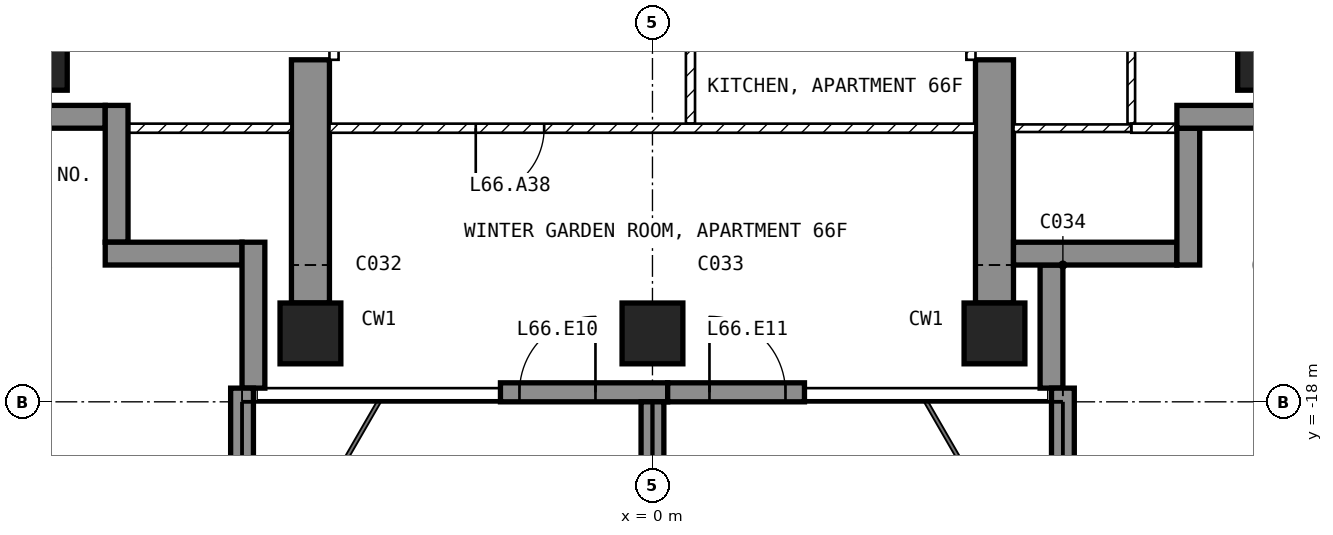
"""IFC4 building model, lengths in metres.
Left out: names, types, materials, properties, quantities, classifications, styles, units other than length and angle.
Written with IfcOpenShell. Run it as: python <this file> out.ifc"""

import sys

from ifc_helpers import new_model, si_unit, direction, frame, frame_2d, origin, origin_2d, place, context, subcontext, project, spatial, polyline, rectangle, outline, extrude, element, fill, save


model = new_model("IFC4")
c1 = context("Model", 3, precision=1e-05, world=origin(), true_north=direction((0.0, 1.0)))
c2 = subcontext(c1, "Body", "Model", "MODEL_VIEW")
j1 = project(units=[si_unit("LENGTHUNIT", "METRE"), si_unit("PLANEANGLEUNIT", "RADIAN")], contexts=[c1])
p1 = place(None, origin())
s1 = spatial("IfcSite", under=j1, at=p1, CompositionType="ELEMENT")
p2 = place(p1, origin())
s2 = spatial("IfcBuilding", under=s1, at=p2, CompositionType="ELEMENT")
p3 = place(p2, frame((0.0, 0.0, 260.5)))
s3 = spatial("IfcBuildingStorey", under=s2, at=p3, CompositionType="ELEMENT", Elevation=260.5)
for number, where, z_axis, x_axis in (
    (1, (-8.1, -13.5, -0.25), (0.0, 0.0, 1.0), (1.0, 0.0, 0.0)),
    (2, (-4.5, -17.1, -0.25), (0.0, 0.0, 1.0), (1.0, 0.0, 0.0)),
    (3, (0.0, -17.1, -0.25), (0.0, 0.0, 1.0), (1.0, 0.0, 0.0)),
    (4, (4.5, -17.1, -0.25), (0.0, 0.0, 1.0), (1.0, 0.0, 0.0)),
    (5, (8.1, -13.5, -0.25), (0.0, 0.0, 1.0), (1.0, 0.0, 0.0)),
):
    element("IfcColumn", number, at=place(p3, frame(where, z_axis=z_axis, x_axis=x_axis)), inside=s3, PredefinedType="COLUMN", context=c2, shape_type="SweptSolid", body=[
        extrude(rectangle(XDim=0.8, YDim=0.8, at=origin_2d()), origin(), (0.0, 0.0, 1.0), 3.5),
    ])
for number, where, z_axis, x_axis in (
    (6, (-4.75, -16.7, -0.25), (1.0, 0.0, 0.0), (0.0, 1.0, 0.0)),
    (7, (4.25, -16.7, -0.25), (1.0, 0.0, 0.0), (0.0, 1.0, 0.0)),
):
    element("IfcWall", number, at=place(p3, frame(where, z_axis=z_axis, x_axis=x_axis)), inside=s3, PredefinedType="SHEAR", context=c2, shape_type="SweptSolid", body=[
        extrude(outline(polyline([(0.0, 0.0), (3.2, 0.0), (3.2, 2.65), (5.6, 2.65), (5.6, 0.0), (7.7, 0.0), (7.7, 3.5), (0.0, 3.5), (0.0, 0.0)])), origin(), (0.0, 0.0, 1.0), 0.5),
    ])
p4 = place(p3, frame((-2.0, -17.875, 0.0), z_axis=(0.0, 0.0, 1.0), x_axis=(1.0, 0.0, 0.0)))
e8 = element("IfcWall", 8, at=p4, inside=s3, PredefinedType="SOLIDWALL", context=c2, shape_type="SweptSolid", body=[
    extrude(rectangle(XDim=2.2, YDim=0.25, at=frame_2d((1.1, 0.0))), origin(), (0.0, 0.0, 1.0), 3.25),
])
p5 = place(p4, frame((0.25, 0.0, 0.0)))
e9 = element("IfcOpeningElement", 9, at=p5, cuts=e8, PredefinedType="OPENING", context=c2, shape_type="SweptSolid", body=[
    extrude(rectangle(XDim=1.0, YDim=2.4, at=frame_2d((0.5, 1.2))), frame((0.0, 0.135, 0.0), z_axis=(0.0, -1.0, 0.0), x_axis=(1.0, 0.0, 0.0)), (0.0, 0.0, 1.0), 0.27),
])
p6 = place(p3, frame((0.2, -17.875, 0.0), z_axis=(0.0, 0.0, 1.0), x_axis=(1.0, 0.0, 0.0)))
e10 = element("IfcWall", 10, at=p6, inside=s3, PredefinedType="SOLIDWALL", context=c2, shape_type="SweptSolid", body=[
    extrude(rectangle(XDim=1.8, YDim=0.25, at=frame_2d((0.9, 0.0))), origin(), (0.0, 0.0, 1.0), 3.25),
])
p7 = place(p6, frame((0.55, 0.0, 0.0)))
e11 = element("IfcOpeningElement", 11, at=p7, cuts=e10, PredefinedType="OPENING", context=c2, shape_type="SweptSolid", body=[
    extrude(rectangle(XDim=1.0, YDim=2.4, at=frame_2d((0.5, 1.2))), frame((0.0, 0.135, 0.0), z_axis=(0.0, -1.0, 0.0), x_axis=(1.0, 0.0, 0.0)), (0.0, 0.0, 1.0), 0.27),
])
p8 = place(p3, frame((5.25, -17.82, 0.0), z_axis=(0.0, 0.0, 1.0), x_axis=(0.0, 1.0, 0.0)))
e12 = element("IfcWall", 12, at=p8, inside=s3, PredefinedType="SOLIDWALL", context=c2, shape_type="SweptSolid", body=[
    extrude(rectangle(XDim=1.62, YDim=0.3, at=frame_2d((0.81, 0.0))), origin(), (0.0, 0.0, 1.0), 3.25),
])
p9 = place(p3, frame((4.75, -16.05, 0.0), z_axis=(0.0, 0.0, 1.0), x_axis=(1.0, 0.0, 0.0)))
e13 = element("IfcWall", 13, at=p9, inside=s3, PredefinedType="SOLIDWALL", context=c2, shape_type="SweptSolid", body=[
    extrude(rectangle(XDim=2.15, YDim=0.3, at=frame_2d((1.075, 0.0))), origin(), (0.0, 0.0, 1.0), 3.25),
])
p10 = place(p3, frame((7.05, -16.2, 0.0), z_axis=(0.0, 0.0, 1.0), x_axis=(0.0, 1.0, 0.0)))
e14 = element("IfcWall", 14, at=p10, inside=s3, PredefinedType="SOLIDWALL", context=c2, shape_type="SweptSolid", body=[
    extrude(rectangle(XDim=1.8, YDim=0.3, at=frame_2d((0.9, 0.0))), origin(), (0.0, 0.0, 1.0), 3.25),
])
p11 = place(p3, frame((6.9, -14.25, 0.0), z_axis=(0.0, 0.0, 1.0), x_axis=(1.0, 0.0, 0.0)))
e15 = element("IfcWall", 15, at=p11, inside=s3, PredefinedType="SOLIDWALL", context=c2, shape_type="SweptSolid", body=[
    extrude(rectangle(XDim=1.85, YDim=0.3, at=frame_2d((0.925, 0.0))), origin(), (0.0, 0.0, 1.0), 3.25),
])
p12 = place(p3, frame((-8.75, -14.25, 0.0), z_axis=(0.0, 0.0, 1.0), x_axis=(1.0, 0.0, 0.0)))
e16 = element("IfcWall", 16, at=p12, inside=s3, PredefinedType="SOLIDWALL", context=c2, shape_type="SweptSolid", body=[
    extrude(rectangle(XDim=1.55, YDim=0.3, at=frame_2d((0.775, 0.0))), origin(), (0.0, 0.0, 1.0), 3.25),
])
p13 = place(p3, frame((-7.05, -14.1, 0.0), z_axis=(0.0, 0.0, 1.0), x_axis=(0.0, -1.0, 0.0)))
e17 = element("IfcWall", 17, at=p13, inside=s3, PredefinedType="SOLIDWALL", context=c2, shape_type="SweptSolid", body=[
    extrude(rectangle(XDim=1.8, YDim=0.3, at=frame_2d((0.9, 0.0))), origin(), (0.0, 0.0, 1.0), 3.25),
])
p14 = place(p3, frame((-7.2, -16.05, 0.0), z_axis=(0.0, 0.0, 1.0), x_axis=(1.0, 0.0, 0.0)))
e18 = element("IfcWall", 18, at=p14, inside=s3, PredefinedType="SOLIDWALL", context=c2, shape_type="SweptSolid", body=[
    extrude(rectangle(XDim=1.8, YDim=0.3, at=frame_2d((0.9, 0.0))), origin(), (0.0, 0.0, 1.0), 3.25),
])
p15 = place(p3, frame((-5.25, -15.9, 0.0), z_axis=(0.0, 0.0, 1.0), x_axis=(0.0, -1.0, 0.0)))
e19 = element("IfcWall", 19, at=p15, inside=s3, PredefinedType="SOLIDWALL", context=c2, shape_type="SweptSolid", body=[
    extrude(rectangle(XDim=1.92, YDim=0.3, at=frame_2d((0.96, 0.0))), origin(), (0.0, 0.0, 1.0), 3.25),
])
p16 = place(p3, frame((-5.4, -17.82, 0.0), z_axis=(0.0, 0.0, 1.0), x_axis=(0.0, -1.0, 0.0)))
e20 = element("IfcWall", 20, at=p16, inside=s3, PredefinedType="SOLIDWALL", context=c2, shape_type="SweptSolid", body=[
    extrude(rectangle(XDim=2.88, YDim=0.3, at=frame_2d((1.44, 0.0))), origin(), (0.0, 0.0, 1.0), 3.25),
])
p17 = place(p3, frame((0.0, -18.0, 0.0), z_axis=(0.0, 0.0, 1.0), x_axis=(0.0, -1.0, 0.0)))
e21 = element("IfcWall", 21, at=p17, inside=s3, PredefinedType="SOLIDWALL", context=c2, shape_type="SweptSolid", body=[
    extrude(rectangle(XDim=2.7, YDim=0.3, at=frame_2d((1.35, 0.0))), origin(), (0.0, 0.0, 1.0), 3.25),
])
p18 = place(p3, frame((5.4, -17.82, 0.0), z_axis=(0.0, 0.0, 1.0), x_axis=(0.0, -1.0, 0.0)))
e22 = element("IfcWall", 22, at=p18, inside=s3, PredefinedType="SOLIDWALL", context=c2, shape_type="SweptSolid", body=[
    extrude(rectangle(XDim=2.88, YDim=0.3, at=frame_2d((1.44, 0.0))), origin(), (0.0, 0.0, 1.0), 3.25),
])
p19 = place(p3, frame((0.5, -11.46, 0.0), z_axis=(0.0, 0.0, 1.0), x_axis=(0.0, -1.0, 0.0)))
e23 = element("IfcWall", 23, at=p19, inside=s3, PredefinedType="PARTITIONING", context=c2, shape_type="SweptSolid", body=[
    extrude(rectangle(XDim=2.88, YDim=0.12, at=frame_2d((1.44, 0.0))), origin(), (0.0, 0.0, 1.0), 3.25),
])
p20 = place(p19, frame((0.99, 0.0, 0.0)))
e24 = element("IfcOpeningElement", 24, at=p20, cuts=e23, PredefinedType="OPENING", context=c2, shape_type="SweptSolid", body=[
    extrude(rectangle(XDim=0.9, YDim=2.1, at=frame_2d((0.45, 1.05))), frame((0.0, 0.07, 0.0), z_axis=(0.0, -1.0, 0.0), x_axis=(1.0, 0.0, 0.0)), (0.0, 0.0, 1.0), 0.14),
])
p21 = place(p3, frame((4.25, -14.4, 0.0), z_axis=(0.0, 0.0, 1.0), x_axis=(-1.0, 0.0, 0.0)))
e25 = element("IfcWall", 25, at=p21, inside=s3, PredefinedType="PARTITIONING", context=c2, shape_type="SweptSolid", body=[
    extrude(rectangle(XDim=8.5, YDim=0.12, at=frame_2d((4.25, 0.0))), origin(), (0.0, 0.0, 1.0), 3.25),
])
p22 = place(p21, frame((5.675, 0.0, 0.0)))
e26 = element("IfcOpeningElement", 26, at=p22, cuts=e25, PredefinedType="OPENING", context=c2, shape_type="SweptSolid", body=[
    extrude(rectangle(XDim=0.9, YDim=2.1, at=frame_2d((0.45, 1.05))), frame((0.0, 0.07, 0.0), z_axis=(0.0, -1.0, 0.0), x_axis=(1.0, 0.0, 0.0)), (0.0, 0.0, 1.0), 0.14),
])
p23 = place(p3, frame((6.3, -14.34, 0.0), z_axis=(0.0, 0.0, 1.0), x_axis=(0.0, 1.0, 0.0)))
e27 = element("IfcWall", 27, at=p23, inside=s3, PredefinedType="PARTITIONING", context=c2, shape_type="SweptSolid", body=[
    extrude(rectangle(XDim=2.89, YDim=0.1, at=frame_2d((1.445, 0.0))), origin(), (0.0, 0.0, 1.0), 3.25),
])
p24 = place(p23, frame((1.02, 0.0, 0.0)))
e28 = element("IfcOpeningElement", 28, at=p24, cuts=e27, PredefinedType="OPENING", context=c2, shape_type="SweptSolid", body=[
    extrude(rectangle(XDim=0.85, YDim=2.1, at=frame_2d((0.425, 1.05))), frame((0.0, 0.06, 0.0), z_axis=(0.0, -1.0, 0.0), x_axis=(1.0, 0.0, 0.0)), (0.0, 0.0, 1.0), 0.12),
])
p25 = place(p3, frame((7.12, -14.4, 0.0), z_axis=(0.0, 0.0, 1.0), x_axis=(-1.0, 0.0, 0.0)))
e29 = element("IfcWall", 29, at=p25, inside=s3, PredefinedType="PARTITIONING", context=c2, shape_type="SweptSolid", body=[
    extrude(rectangle(XDim=0.82, YDim=0.12, at=frame_2d((0.41, 0.0))), origin(), (0.0, 0.0, 1.0), 3.25),
])
p26 = place(p3, frame((6.3, -14.4, 0.0), z_axis=(0.0, 0.0, 1.0), x_axis=(-1.0, 0.0, 0.0)))
e30 = element("IfcWall", 30, at=p26, inside=s3, PredefinedType="PARTITIONING", context=c2, shape_type="SweptSolid", body=[
    extrude(rectangle(XDim=1.55, YDim=0.1, at=frame_2d((0.775, 0.0))), origin(), (0.0, 0.0, 1.0), 3.25),
])
p27 = place(p3, frame((-4.75, -14.4, 0.0), z_axis=(0.0, 0.0, 1.0), x_axis=(-1.0, 0.0, 0.0)))
e31 = element("IfcWall", 31, at=p27, inside=s3, PredefinedType="PARTITIONING", context=c2, shape_type="SweptSolid", body=[
    extrude(rectangle(XDim=2.37, YDim=0.12, at=frame_2d((1.185, 0.0))), origin(), (0.0, 0.0, 1.0), 3.25),
])
p28 = place(p3, frame((4.19, -11.1, 0.0), z_axis=(0.0, 0.0, 1.0), x_axis=(0.0, -1.0, 0.0)))
e32 = element("IfcWall", 32, at=p28, inside=s3, PredefinedType="PARTITIONING", context=c2, shape_type="SweptSolid", body=[
    extrude(rectangle(XDim=2.4, YDim=0.12, at=frame_2d((1.2, 0.0))), origin(), (0.0, 0.0, 1.0), 2.4),
])
p29 = place(p28, frame((0.75, 0.0, 0.0)))
e33 = element("IfcOpeningElement", 33, at=p29, cuts=e32, PredefinedType="OPENING", context=c2, shape_type="SweptSolid", body=[
    extrude(rectangle(XDim=0.9, YDim=2.1, at=frame_2d((0.45, 1.05))), frame((0.0, 0.07, 0.0), z_axis=(0.0, -1.0, 0.0), x_axis=(1.0, 0.0, 0.0)), (0.0, 0.0, 1.0), 0.14),
])
p30 = place(p3, frame((-4.19, -11.1, 0.0), z_axis=(0.0, 0.0, 1.0), x_axis=(0.0, -1.0, 0.0)))
e34 = element("IfcWall", 34, at=p30, inside=s3, PredefinedType="PARTITIONING", context=c2, shape_type="SweptSolid", body=[
    extrude(rectangle(XDim=2.4, YDim=0.12, at=frame_2d((1.2, 0.0))), origin(), (0.0, 0.0, 1.0), 2.4),
])
p31 = place(p30, frame((0.75, 0.0, 0.0)))
e35 = element("IfcOpeningElement", 35, at=p31, cuts=e34, PredefinedType="OPENING", context=c2, shape_type="SweptSolid", body=[
    extrude(rectangle(XDim=0.9, YDim=2.1, at=frame_2d((0.45, 1.05))), frame((0.0, 0.07, 0.0), z_axis=(0.0, -1.0, 0.0), x_axis=(1.0, 0.0, 0.0)), (0.0, 0.0, 1.0), 0.14),
])
p32 = place(p5, origin())
e36 = element("IfcDoor", 36, at=p32, inside=s3, OperationType="SINGLE_SWING_RIGHT", PredefinedType="DOOR", context=c2, shape_type="SweptSolid", body=[
    extrude(rectangle(XDim=1.0, YDim=2.4, at=frame_2d((0.5, 1.2))), frame((0.0, 0.025, 0.0), z_axis=(0.0, -1.0, 0.0), x_axis=(1.0, 0.0, 0.0)), (0.0, 0.0, 1.0), 0.05),
])
fill(e9, e36)
p33 = place(p7, origin())
e37 = element("IfcDoor", 37, at=p33, inside=s3, OperationType="SINGLE_SWING_LEFT", PredefinedType="DOOR", context=c2, shape_type="SweptSolid", body=[
    extrude(rectangle(XDim=1.0, YDim=2.4, at=frame_2d((0.5, 1.2))), frame((0.0, 0.025, 0.0), z_axis=(0.0, -1.0, 0.0), x_axis=(1.0, 0.0, 0.0)), (0.0, 0.0, 1.0), 0.05),
])
fill(e11, e37)
p34 = place(p22, origin())
e38 = element("IfcDoor", 38, at=p34, inside=s3, OperationType="SINGLE_SWING_RIGHT", PredefinedType="DOOR", context=c2, shape_type="SweptSolid", body=[
    extrude(rectangle(XDim=0.9, YDim=2.1, at=frame_2d((0.45, 1.05))), frame((0.0, 0.025, 0.0), z_axis=(0.0, -1.0, 0.0), x_axis=(1.0, 0.0, 0.0)), (0.0, 0.0, 1.0), 0.05),
])
fill(e26, e38)
save(model, sys.argv[1])
